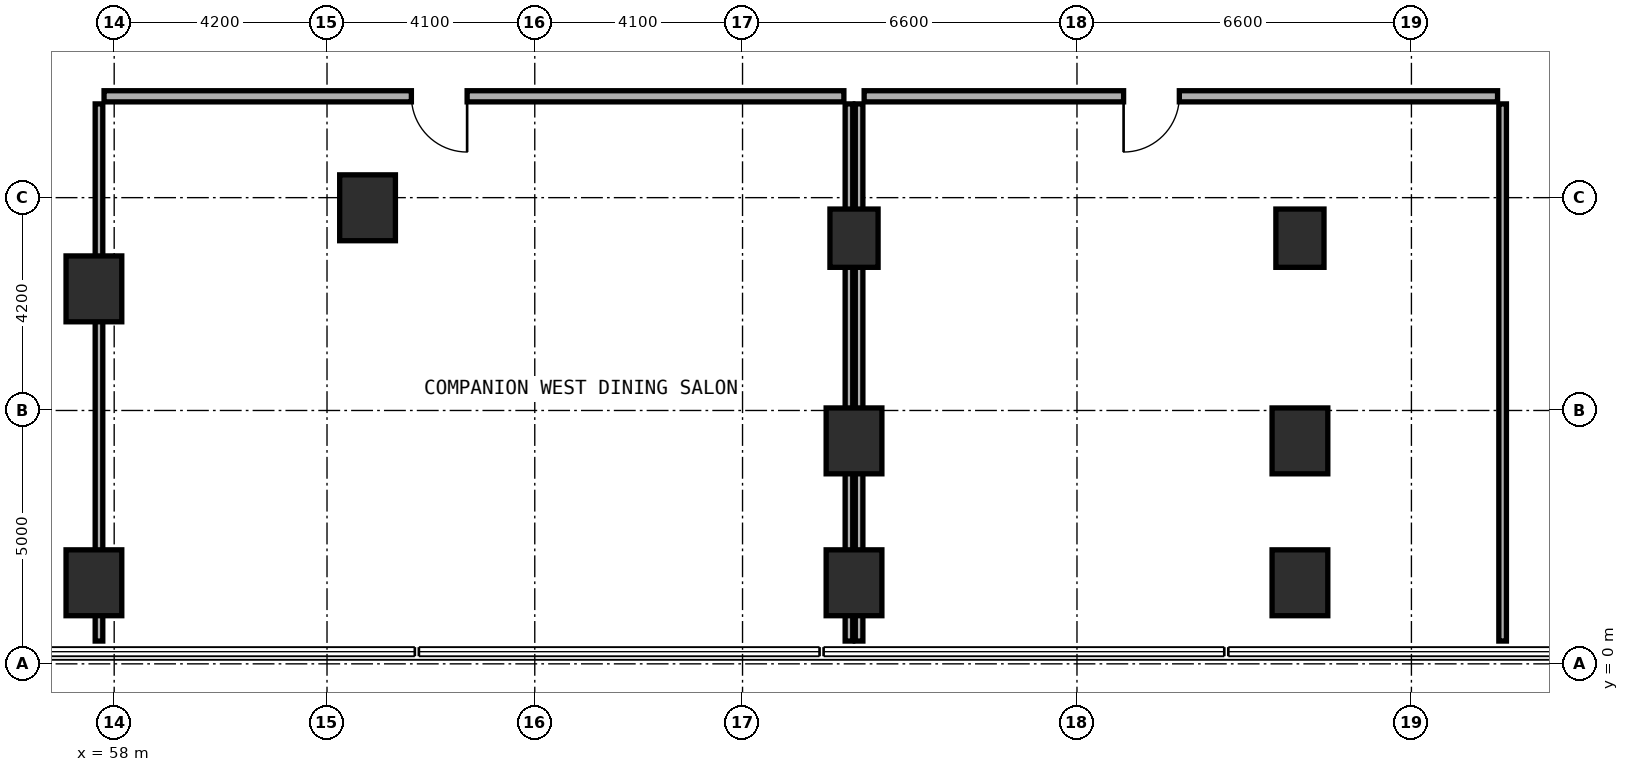
"""IFC4 building model, lengths in metres.
Left out: names, types, materials, properties, quantities, classifications, styles, units other than length and angle.
Written with IfcOpenShell. Run it as: python <this file> out.ifc"""

import sys

from ifc_helpers import new_model, si_unit, direction, frame, frame_2d, origin, origin_2d, place, context, subcontext, project, spatial, rectangle, extrude, element, fill, save


model = new_model("IFC4")
c1 = context("Model", 3, precision=1e-05, world=origin(), true_north=direction((0.0, 1.0)))
c2 = subcontext(c1, "Body", "Model", "MODEL_VIEW")
j1 = project(units=[si_unit("LENGTHUNIT", "METRE"), si_unit("PLANEANGLEUNIT", "RADIAN")], contexts=[c1])
p1 = place(None, origin())
s1 = spatial("IfcSite", under=j1, at=p1, CompositionType="ELEMENT")
p2 = place(p1, origin())
s2 = spatial("IfcBuilding", under=s1, at=p2, CompositionType="ELEMENT")
p3 = place(p2, frame((0.0, 0.0, 5.4)))
s3 = spatial("IfcBuildingStorey", under=s2, at=p3, CompositionType="ELEMENT", Elevation=5.4)
for number, where, z_axis, x_axis in (
    (1, (72.6, 8.4, 0.0), (0.0, 0.0, 1.0), (1.0, 0.0, 0.0)),
    (2, (81.4, 8.4, 0.0), (0.0, 0.0, 1.0), (1.0, 0.0, 0.0)),
):
    element("IfcColumn", number, at=place(p3, frame(where, z_axis=z_axis, x_axis=x_axis)), inside=s3, PredefinedType="COLUMN", context=c2, shape_type="SweptSolid", body=[
        extrude(rectangle(XDim=0.95, YDim=1.15, at=origin_2d()), origin(), (0.0, 0.0, 1.0), 4.8),
    ])
for number, where, z_axis, x_axis in (
    (3, (63.0, 9.0, 0.0), (0.0, 0.0, 1.0), (1.0, 0.0, 0.0)),
    (4, (57.6, 1.6, 0.0), (0.0, 0.0, 1.0), (1.0, 0.0, 0.0)),
    (5, (72.6, 1.6, 0.0), (0.0, 0.0, 1.0), (1.0, 0.0, 0.0)),
    (6, (81.4, 1.6, 0.0), (0.0, 0.0, 1.0), (1.0, 0.0, 0.0)),
    (7, (72.6, 4.4, 0.0), (0.0, 0.0, 1.0), (1.0, 0.0, 0.0)),
    (8, (81.4, 4.4, 0.0), (0.0, 0.0, 1.0), (1.0, 0.0, 0.0)),
    (9, (57.6, 7.4, 0.0), (0.0, 0.0, 1.0), (1.0, 0.0, 0.0)),
):
    element("IfcColumn", number, at=place(p3, frame(where, z_axis=z_axis, x_axis=x_axis)), inside=s3, PredefinedType="COLUMN", context=c2, shape_type="SweptSolid", body=[
        extrude(rectangle(XDim=1.1, YDim=1.3, at=origin_2d()), origin(), (0.0, 0.0, 1.0), 4.8),
    ])
p4 = place(p3, frame((57.7, 0.45, 0.0), z_axis=(0.0, 0.0, 1.0), x_axis=(0.0, 1.0, 0.0)))
e10 = element("IfcWall", 10, at=p4, inside=s3, PredefinedType="PARTITIONING", context=c2, shape_type="SweptSolid", body=[
    extrude(rectangle(XDim=10.6, YDim=0.15, at=frame_2d((5.3, 0.0))), origin(), (0.0, 0.0, 1.0), 3.725),
])
p5 = place(p3, frame((72.5, 0.45, 0.0), z_axis=(0.0, 0.0, 1.0), x_axis=(0.0, 1.0, 0.0)))
e11 = element("IfcWall", 11, at=p5, inside=s3, PredefinedType="PARTITIONING", context=c2, shape_type="SweptSolid", body=[
    extrude(rectangle(XDim=10.6, YDim=0.15, at=frame_2d((5.3, 0.0))), origin(), (0.0, 0.0, 1.0), 3.925),
])
p6 = place(p3, frame((57.8, 11.2, 0.0), z_axis=(0.0, 0.0, 1.0), x_axis=(1.0, 0.0, 0.0)))
e12 = element("IfcWall", 12, at=p6, inside=s3, PredefinedType="SOLIDWALL", context=c2, shape_type="SweptSolid", body=[
    extrude(rectangle(XDim=14.6, YDim=0.22, at=frame_2d((7.3, 0.0))), origin(), (0.0, 0.0, 1.0), 4.065),
])
p7 = place(p6, frame((6.065, 0.0, 0.0)))
e13 = element("IfcOpeningElement", 13, at=p7, cuts=e12, PredefinedType="OPENING", context=c2, shape_type="SweptSolid", body=[
    extrude(rectangle(XDim=1.1, YDim=2.1, at=frame_2d((0.55, 1.05))), frame((0.0, 0.12, 0.0), z_axis=(0.0, -1.0, 0.0), x_axis=(1.0, 0.0, 0.0)), (0.0, 0.0, 1.0), 0.24),
])
p8 = place(p3, frame((72.7, 0.45, 0.0), z_axis=(0.0, 0.0, 1.0), x_axis=(0.0, 1.0, 0.0)))
e14 = element("IfcWall", 14, at=p8, inside=s3, PredefinedType="PARTITIONING", context=c2, shape_type="SweptSolid", body=[
    extrude(rectangle(XDim=10.6, YDim=0.15, at=frame_2d((5.3, 0.0))), origin(), (0.0, 0.0, 1.0), 3.825),
])
p9 = place(p3, frame((85.4, 0.45, 0.0), z_axis=(0.0, 0.0, 1.0), x_axis=(0.0, 1.0, 0.0)))
e15 = element("IfcWall", 15, at=p9, inside=s3, PredefinedType="PARTITIONING", context=c2, shape_type="SweptSolid", body=[
    extrude(rectangle(XDim=10.6, YDim=0.15, at=frame_2d((5.3, 0.0))), origin(), (0.0, 0.0, 1.0), 3.625),
])
p10 = place(p3, frame((72.8, 11.2, 0.0), z_axis=(0.0, 0.0, 1.0), x_axis=(1.0, 0.0, 0.0)))
e16 = element("IfcWall", 16, at=p10, inside=s3, PredefinedType="SOLIDWALL", context=c2, shape_type="SweptSolid", body=[
    extrude(rectangle(XDim=12.5, YDim=0.22, at=frame_2d((6.25, 0.0))), origin(), (0.0, 0.0, 1.0), 3.925),
])
p11 = place(p10, frame((5.12, 0.0, 0.0)))
e17 = element("IfcOpeningElement", 17, at=p11, cuts=e16, PredefinedType="OPENING", context=c2, shape_type="SweptSolid", body=[
    extrude(rectangle(XDim=1.1, YDim=2.1, at=frame_2d((0.55, 1.05))), frame((0.0, 0.12, 0.0), z_axis=(0.0, -1.0, 0.0), x_axis=(1.0, 0.0, 0.0)), (0.0, 0.0, 1.0), 0.24),
])
p12 = place(p7, frame((1.1, 0.0, 0.0), z_axis=(0.0, 0.0, 1.0), x_axis=(-1.0, 0.0, 0.0)))
e18 = element("IfcDoor", 18, at=p12, inside=s3, OperationType="SINGLE_SWING_LEFT", PredefinedType="DOOR", context=c2, shape_type="SweptSolid", body=[
    extrude(rectangle(XDim=1.1, YDim=2.1, at=frame_2d((0.55, 1.05))), frame((0.0, 0.025, 0.0), z_axis=(0.0, -1.0, 0.0), x_axis=(1.0, 0.0, 0.0)), (0.0, 0.0, 1.0), 0.05),
])
fill(e13, e18)
p13 = place(p11, frame((1.1, 0.0, 0.0), z_axis=(0.0, 0.0, 1.0), x_axis=(-1.0, 0.0, 0.0)))
e19 = element("IfcDoor", 19, at=p13, inside=s3, OperationType="SINGLE_SWING_RIGHT", PredefinedType="DOOR", context=c2, shape_type="SweptSolid", body=[
    extrude(rectangle(XDim=1.1, YDim=2.1, at=frame_2d((0.55, 1.05))), frame((0.0, 0.025, 0.0), z_axis=(0.0, -1.0, 0.0), x_axis=(1.0, 0.0, 0.0)), (0.0, 0.0, 1.0), 0.05),
])
fill(e17, e19)
save(model, sys.argv[1])
